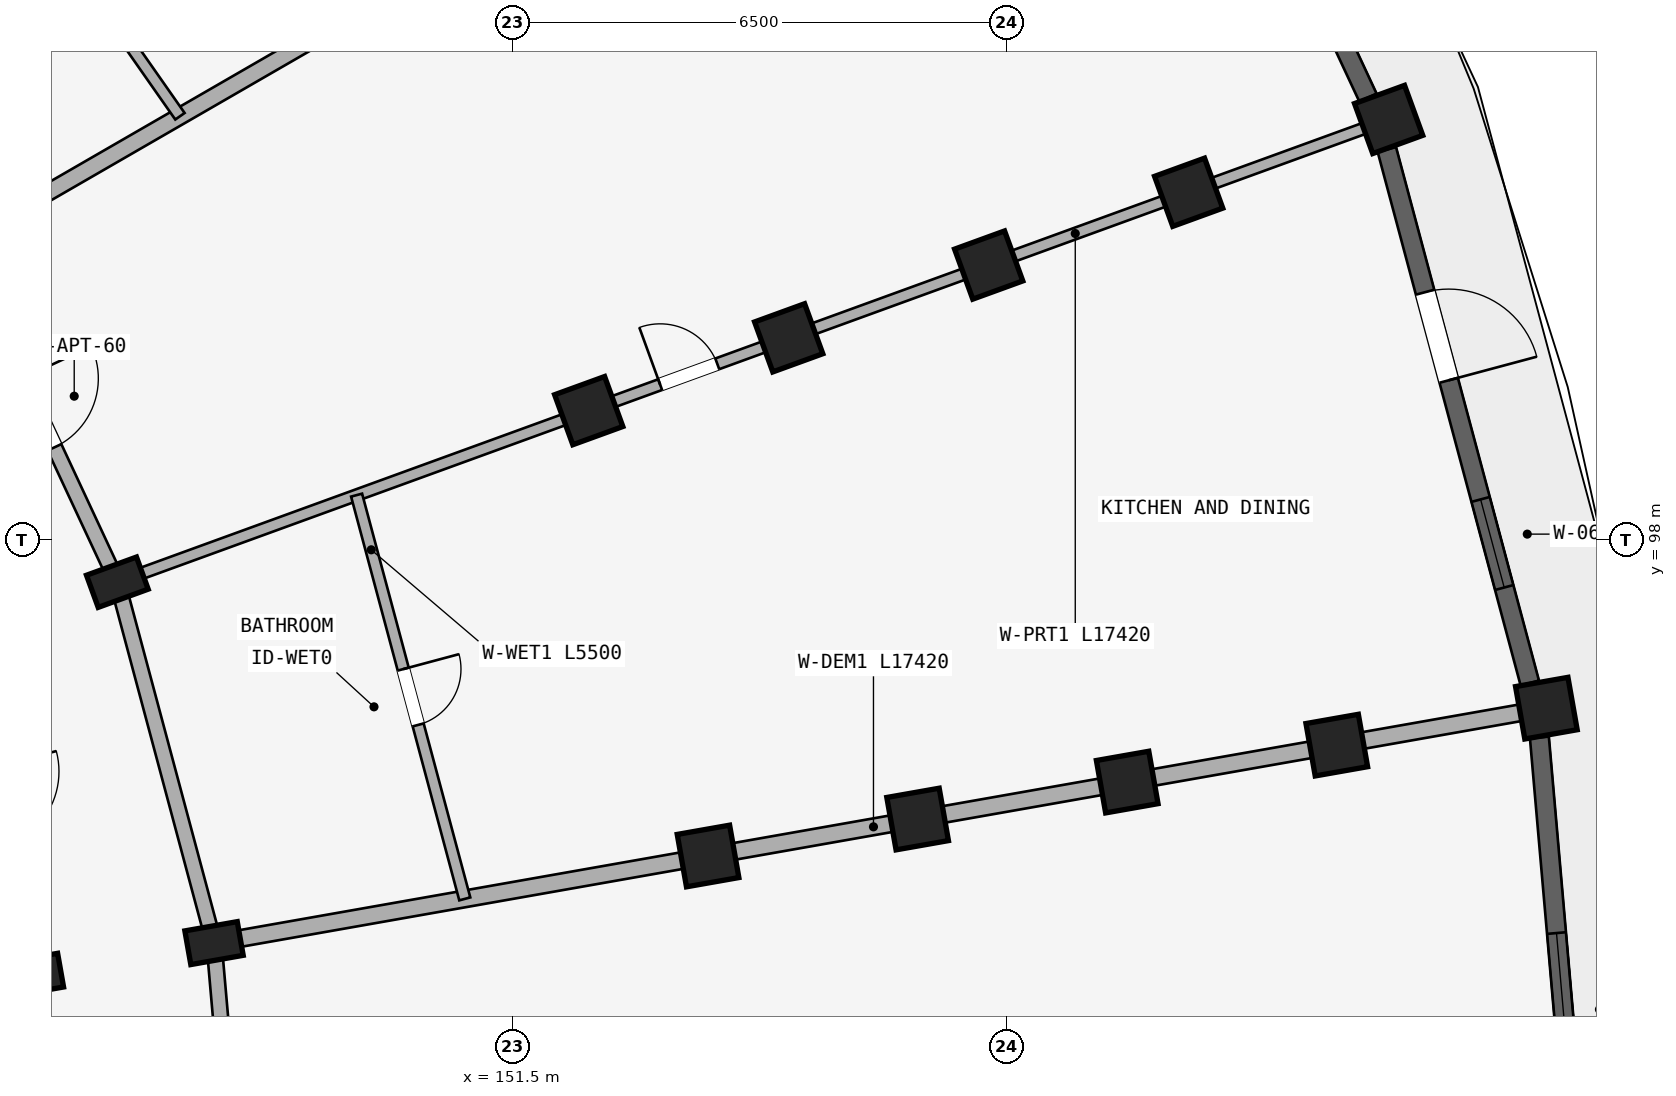
"""IFC4 building model, lengths in metres.
Left out: names, types, materials, properties, quantities, classifications, styles, units other than length and angle.
Written with IfcOpenShell. Run it as: python <this file> out.ifc"""

import sys

from ifc_helpers import new_model, si_unit, direction, frame, frame_2d, origin, origin_2d, place, context, subcontext, project, spatial, rectangle, extrude, element, fill, save


model = new_model("IFC4")
c1 = context("Model", 3, precision=1e-05, world=origin(), true_north=direction((0.0, 1.0)))
c2 = subcontext(c1, "Body", "Model", "MODEL_VIEW")
j1 = project(units=[si_unit("LENGTHUNIT", "METRE"), si_unit("PLANEANGLEUNIT", "RADIAN")], contexts=[c1])
p1 = place(None, origin())
s1 = spatial("IfcSite", under=j1, at=p1, CompositionType="ELEMENT")
p2 = place(p1, origin())
s2 = spatial("IfcBuilding", under=s1, at=p2, CompositionType="ELEMENT")
p3 = place(p2, frame((0.0, 0.0, 24.45)))
s3 = spatial("IfcBuildingStorey", under=s2, at=p3, CompositionType="ELEMENT", Elevation=24.45)
p4 = place(p3, frame((146.299, 97.445, 0.0), z_axis=(0.0, 0.0, 1.0), x_axis=(-0.342020143326, 0.939692620786, 0.0)))
e1 = element("IfcColumn", 1, at=p4, inside=s3, PredefinedType="COLUMN", context=c2, shape_type="SweptSolid", body=[
    extrude(rectangle(XDim=0.45, YDim=0.7, at=origin_2d()), origin(), (0.0, 0.0, 1.0), 2.93),
])
for number, where, z_axis, x_axis in (
    (2, (152.501, 99.702, 0.0), (0.0, 0.0, 1.0), (-0.342, 0.94, 0.0)),
    (3, (155.132, 100.66, 0.0), (0.0, 0.0, 1.0), (-0.342, 0.94, 0.0)),
    (4, (157.764, 101.618, 0.0), (0.0, 0.0, 1.0), (-0.342, 0.94, 0.0)),
    (5, (160.395, 102.575, 0.0), (0.0, 0.0, 1.0), (-0.342, 0.94, 0.0)),
    (6, (163.026, 103.533, 0.0), (0.0, 0.0, 1.0), (-0.342, 0.94, 0.0)),
):
    element("IfcColumn", number, at=place(p3, frame(where, z_axis=z_axis, x_axis=x_axis)), inside=s3, PredefinedType="COLUMN", context=c2, shape_type="SweptSolid", body=[
        extrude(rectangle(XDim=0.7, YDim=0.7, at=origin_2d()), origin(), (0.0, 0.0, 1.0), 2.93),
    ])
for number, where, z_axis, x_axis in (
    (7, (145.208, 92.28, 0.0), (0.0, 0.0, 1.0), (-0.174, 0.985, 0.0)),
    (8, (147.572, 92.697, 0.0), (0.0, 0.0, 1.0), (-0.174, 0.985, 0.0)),
):
    element("IfcColumn", number, at=place(p3, frame(where, z_axis=z_axis, x_axis=x_axis)), inside=s3, PredefinedType="COLUMN", context=c2, shape_type="SweptSolid", body=[
        extrude(rectangle(XDim=0.45, YDim=0.7, at=origin_2d()), origin(), (0.0, 0.0, 1.0), 2.93),
    ])
for number, where, z_axis, x_axis in (
    (9, (154.071, 93.843, 0.0), (0.0, 0.0, 1.0), (-0.174, 0.985, 0.0)),
    (10, (156.829, 94.329, 0.0), (0.0, 0.0, 1.0), (-0.174, 0.985, 0.0)),
    (11, (159.586, 94.815, 0.0), (0.0, 0.0, 1.0), (-0.174, 0.985, 0.0)),
    (12, (162.344, 95.302, 0.0), (0.0, 0.0, 1.0), (-0.174, 0.985, 0.0)),
    (13, (165.101, 95.788, 0.0), (0.0, 0.0, 1.0), (-0.174, 0.985, 0.0)),
):
    element("IfcColumn", number, at=place(p3, frame(where, z_axis=z_axis, x_axis=x_axis)), inside=s3, PredefinedType="COLUMN", context=c2, shape_type="SweptSolid", body=[
        extrude(rectangle(XDim=0.7, YDim=0.7, at=origin_2d()), origin(), (0.0, 0.0, 1.0), 2.93),
    ])
p5 = place(p3, frame((144.222, 101.9, 0.0), z_axis=(0.0, 0.0, 1.0), x_axis=(0.422629854778, -0.906302381024, 0.0)))
e14 = element("IfcWall", 14, at=p5, inside=s3, PredefinedType="STANDARD", context=c2, shape_type="SweptSolid", body=[
    extrude(rectangle(XDim=4.915, YDim=0.2, at=frame_2d((2.458, 0.0))), origin(), (0.0, 0.0, 1.0), 2.372),
])
p6 = place(p5, frame((1.958, 0.0, 0.0)))
e15 = element("IfcOpeningElement", 15, at=p6, cuts=e14, PredefinedType="OPENING", context=c2, shape_type="SweptSolid", body=[
    extrude(rectangle(XDim=1.0, YDim=2.15, at=frame_2d((0.5, 1.075))), frame((0.0, 0.11, 0.0), z_axis=(0.0, -1.0, 0.0), x_axis=(1.0, 0.0, 0.0)), (0.0, 0.0, 1.0), 0.22),
])
p7 = place(p3, frame((146.299, 97.445, 0.0), z_axis=(0.0, 0.0, 1.0), x_axis=(0.258803112091, -0.965930095386, 0.0)))
e16 = element("IfcWall", 16, at=p7, inside=s3, PredefinedType="STANDARD", context=c2, shape_type="SweptSolid", body=[
    extrude(rectangle(XDim=4.916, YDim=0.2, at=frame_2d((2.458, 0.0))), origin(), (0.0, 0.0, 1.0), 2.372),
])
p8 = place(p3, frame((145.208, 92.28, 0.0), z_axis=(0.0, 0.0, 1.0), x_axis=(0.087187153726, -0.996191949488, 0.0)))
e17 = element("IfcWall", 17, at=p8, inside=s3, PredefinedType="STANDARD", context=c2, shape_type="SweptSolid", body=[
    extrude(rectangle(XDim=4.497, YDim=0.2, at=frame_2d((2.249, 0.0))), origin(), (0.0, 0.0, 1.0), 2.372),
])
p9 = place(p3, frame((147.572, 92.697, 0.0), z_axis=(0.0, 0.0, 1.0), x_axis=(0.087167566415, -0.996193663584, 0.0)))
e18 = element("IfcWall", 18, at=p9, inside=s3, PredefinedType="STANDARD", context=c2, shape_type="SweptSolid", body=[
    extrude(rectangle(XDim=4.916, YDim=0.2, at=frame_2d((2.458, 0.0))), origin(), (0.0, 0.0, 1.0), 2.372),
])
p10 = place(p9, frame((1.938, 0.0, 0.0)))
e19 = element("IfcOpeningElement", 19, at=p10, cuts=e18, PredefinedType="OPENING", context=c2, shape_type="SweptSolid", body=[
    extrude(rectangle(XDim=1.04, YDim=2.15, at=frame_2d((0.52, 1.075))), frame((0.0, 0.11, 0.0), z_axis=(0.0, -1.0, 0.0), x_axis=(1.0, 0.0, 0.0)), (0.0, 0.0, 1.0), 0.22),
])
p11 = place(p3, frame((144.309, 101.95, 0.0), z_axis=(0.0, 0.0, 1.0), x_axis=(0.866026648973, 0.499997843263, 0.0)))
e20 = element("IfcWall", 20, at=p11, inside=s3, PredefinedType="STANDARD", context=c2, shape_type="SweptSolid", body=[
    extrude(rectangle(XDim=17.42, YDim=0.22, at=frame_2d((8.71, 0.0))), origin(), (0.0, 0.0, 1.0), 2.372),
])
p12 = place(p3, frame((146.393, 97.479, 0.0), z_axis=(0.0, 0.0, 1.0), x_axis=(0.939691901159, 0.342022120477, 0.0)))
e21 = element("IfcWall", 21, at=p12, inside=s3, PredefinedType="PARTITIONING", context=c2, shape_type="SweptSolid", body=[
    extrude(rectangle(XDim=17.42, YDim=0.15, at=frame_2d((8.71, 0.0))), origin(), (0.0, 0.0, 1.0), 2.372),
])
p13 = place(p12, frame((7.5, 0.0, 0.0)))
e22 = element("IfcOpeningElement", 22, at=p13, cuts=e21, PredefinedType="OPENING", context=c2, shape_type="SweptSolid", body=[
    extrude(rectangle(XDim=0.8, YDim=2.1, at=frame_2d((0.4, 1.05))), frame((0.0, 0.085, 0.0), z_axis=(0.0, -1.0, 0.0), x_axis=(1.0, 0.0, 0.0)), (0.0, 0.0, 1.0), 0.17),
])
p14 = place(p3, frame((147.67, 92.714, 0.0), z_axis=(0.0, 0.0, 1.0), x_axis=(0.984808098809, 0.173646216546, 0.0)))
e23 = element("IfcWall", 23, at=p14, inside=s3, PredefinedType="STANDARD", context=c2, shape_type="SweptSolid", body=[
    extrude(rectangle(XDim=17.42, YDim=0.22, at=frame_2d((8.71, 0.0))), origin(), (0.0, 0.0, 1.0), 2.372),
])
p15 = place(p3, frame((143.969, 108.08, 0.0), z_axis=(0.0, 0.0, 1.0), x_axis=(0.573569599955, -0.819156831143, 0.0)))
e24 = element("IfcWall", 24, at=p15, inside=s3, PredefinedType="PLUMBINGWALL", context=c2, shape_type="SweptSolid", body=[
    extrude(rectangle(XDim=5.5, YDim=0.15, at=frame_2d((2.75, 0.0))), origin(), (0.0, 0.0, 1.0), 2.372),
])
p16 = place(p15, frame((2.35, 0.0, 0.0)))
e25 = element("IfcOpeningElement", 25, at=p16, cuts=e24, PredefinedType="OPENING", context=c2, shape_type="SweptSolid", body=[
    extrude(rectangle(XDim=0.8, YDim=2.1, at=frame_2d((0.4, 1.05))), frame((0.0, 0.085, 0.0), z_axis=(0.0, -1.0, 0.0), x_axis=(1.0, 0.0, 0.0)), (0.0, 0.0, 1.0), 0.17),
])
p17 = place(p3, frame((149.447, 98.591, 0.0), z_axis=(0.0, 0.0, 1.0), x_axis=(0.258806351229, -0.965929227513, 0.0)))
e26 = element("IfcWall", 26, at=p17, inside=s3, PredefinedType="PLUMBINGWALL", context=c2, shape_type="SweptSolid", body=[
    extrude(rectangle(XDim=5.5, YDim=0.15, at=frame_2d((2.75, 0.0))), origin(), (0.0, 0.0, 1.0), 2.372),
])
p18 = place(p17, frame((2.37, 0.0, 0.0)))
e27 = element("IfcOpeningElement", 27, at=p18, cuts=e26, PredefinedType="OPENING", context=c2, shape_type="SweptSolid", body=[
    extrude(rectangle(XDim=0.76, YDim=2.05, at=frame_2d((0.38, 1.025))), frame((0.0, 0.085, 0.0), z_axis=(0.0, -1.0, 0.0), x_axis=(1.0, 0.0, 0.0)), (0.0, 0.0, 1.0), 0.17),
])
p19 = place(p3, frame((159.683, 110.406, 0.0), z_axis=(0.0, 0.0, 1.0), x_axis=(0.422627946127, -0.90630327107, 0.0)))
e28 = element("IfcWall", 28, at=p19, inside=s3, PredefinedType="STANDARD", context=c2, shape_type="SweptSolid", body=[
    extrude(rectangle(XDim=7.267, YDim=0.25, at=frame_2d((3.633, 0.0))), origin(), (0.0, 0.0, 1.0), 2.372),
])
p20 = place(p19, frame((2.808, 0.0, 0.422)))
e29 = element("IfcOpeningElement", 29, at=p20, cuts=e28, PredefinedType="OPENING", context=c2, shape_type="SweptSolid", body=[
    extrude(rectangle(XDim=1.65, YDim=1.75, at=frame_2d((0.825, 0.875))), frame((0.0, 0.135, 0.0), z_axis=(0.0, -1.0, 0.0), x_axis=(1.0, 0.0, 0.0)), (0.0, 0.0, 1.0), 0.27),
])
p21 = place(p3, frame((163.002, 103.137, 0.0), z_axis=(0.0, 0.0, 1.0), x_axis=(0.258802140196, -0.965930355787, 0.0)))
e30 = element("IfcWall", 30, at=p21, inside=s3, PredefinedType="STANDARD", context=c2, shape_type="SweptSolid", body=[
    extrude(rectangle(XDim=7.267, YDim=0.25, at=frame_2d((3.633, 0.0))), origin(), (0.0, 0.0, 1.0), 2.372),
])
p22 = place(p21, frame((4.766, 0.0, 0.522)))
e31 = element("IfcOpeningElement", 31, at=p22, cuts=e30, PredefinedType="OPENING", context=c2, shape_type="SweptSolid", body=[
    extrude(rectangle(XDim=1.2, YDim=1.5, at=frame_2d((0.6, 0.75))), frame((0.0, 0.135, 0.0), z_axis=(0.0, -1.0, 0.0), x_axis=(1.0, 0.0, 0.0)), (0.0, 0.0, 1.0), 0.27),
])
p23 = place(p21, frame((1.943, 0.0, 0.0)))
e32 = element("IfcOpeningElement", 32, at=p23, cuts=e30, PredefinedType="OPENING", context=c2, shape_type="SweptSolid", body=[
    extrude(rectangle(XDim=1.2, YDim=2.15, at=frame_2d((0.6, 1.075))), frame((0.0, 0.135, 0.0), z_axis=(0.0, -1.0, 0.0), x_axis=(1.0, 0.0, 0.0)), (0.0, 0.0, 1.0), 0.27),
])
p24 = place(p3, frame((165.009, 95.403, 0.0), z_axis=(0.0, 0.0, 1.0), x_axis=(0.08718487158, -0.99619214922, 0.0)))
e33 = element("IfcWall", 33, at=p24, inside=s3, PredefinedType="STANDARD", context=c2, shape_type="SweptSolid", body=[
    extrude(rectangle(XDim=7.267, YDim=0.25, at=frame_2d((3.633, 0.0))), origin(), (0.0, 0.0, 1.0), 2.372),
])
p25 = place(p24, frame((2.583, 0.0, 0.372)))
e34 = element("IfcOpeningElement", 34, at=p25, cuts=e33, PredefinedType="OPENING", context=c2, shape_type="SweptSolid", body=[
    extrude(rectangle(XDim=2.1, YDim=1.8, at=frame_2d((1.05, 0.9))), frame((0.0, 0.135, 0.0), z_axis=(0.0, -1.0, 0.0), x_axis=(1.0, 0.0, 0.0)), (0.0, 0.0, 1.0), 0.27),
])
p26 = place(p22, origin())
e35 = element("IfcWindow", 35, at=p26, inside=s3, PartitioningType="SINGLE_PANEL", PredefinedType="WINDOW", context=c2, shape_type="SweptSolid", body=[
    extrude(rectangle(XDim=1.2, YDim=1.5, at=frame_2d((0.6, 0.75))), frame((0.0, 0.03, 0.0), z_axis=(0.0, -1.0, 0.0), x_axis=(1.0, 0.0, 0.0)), (0.0, 0.0, 1.0), 0.06),
])
fill(e31, e35)
p27 = place(p25, origin())
e36 = element("IfcWindow", 36, at=p27, inside=s3, PartitioningType="TRIPLE_PANEL_VERTICAL", PredefinedType="WINDOW", context=c2, shape_type="SweptSolid", body=[
    extrude(rectangle(XDim=2.1, YDim=1.8, at=frame_2d((1.05, 0.9))), frame((0.0, 0.03, 0.0), z_axis=(0.0, -1.0, 0.0), x_axis=(1.0, 0.0, 0.0)), (0.0, 0.0, 1.0), 0.06),
])
fill(e34, e36)
p28 = place(p13, origin())
e37 = element("IfcDoor", 37, at=p28, inside=s3, OperationType="SINGLE_SWING_LEFT", PredefinedType="DOOR", context=c2, shape_type="SweptSolid", body=[
    extrude(rectangle(XDim=0.8, YDim=2.1, at=frame_2d((0.4, 1.05))), frame((0.0, 0.025, 0.0), z_axis=(0.0, -1.0, 0.0), x_axis=(1.0, 0.0, 0.0)), (0.0, 0.0, 1.0), 0.05),
])
fill(e22, e37)
p29 = place(p6, frame((1.0, 0.0, 0.0), z_axis=(0.0, 0.0, 1.0), x_axis=(-1.0, 0.0, 0.0)))
e38 = element("IfcDoor", 38, at=p29, inside=s3, OperationType="SINGLE_SWING_RIGHT", PredefinedType="DOOR", context=c2, shape_type="SweptSolid", body=[
    extrude(rectangle(XDim=1.0, YDim=2.15, at=frame_2d((0.5, 1.075))), frame((0.0, 0.025, 0.0), z_axis=(0.0, -1.0, 0.0), x_axis=(1.0, 0.0, 0.0)), (0.0, 0.0, 1.0), 0.05),
])
fill(e15, e38)
p30 = place(p18, origin())
e39 = element("IfcDoor", 39, at=p30, inside=s3, OperationType="SINGLE_SWING_LEFT", PredefinedType="DOOR", context=c2, shape_type="SweptSolid", body=[
    extrude(rectangle(XDim=0.76, YDim=2.05, at=frame_2d((0.38, 1.025))), frame((0.0, 0.025, 0.0), z_axis=(0.0, -1.0, 0.0), x_axis=(1.0, 0.0, 0.0)), (0.0, 0.0, 1.0), 0.05),
])
fill(e27, e39)
p31 = place(p23, origin())
e40 = element("IfcDoor", 40, at=p31, inside=s3, OperationType="SINGLE_SWING_RIGHT", PredefinedType="DOOR", context=c2, shape_type="SweptSolid", body=[
    extrude(rectangle(XDim=1.2, YDim=2.15, at=frame_2d((0.6, 1.075))), frame((0.0, 0.025, 0.0), z_axis=(0.0, -1.0, 0.0), x_axis=(1.0, 0.0, 0.0)), (0.0, 0.0, 1.0), 0.05),
])
fill(e32, e40)
save(model, sys.argv[1])
